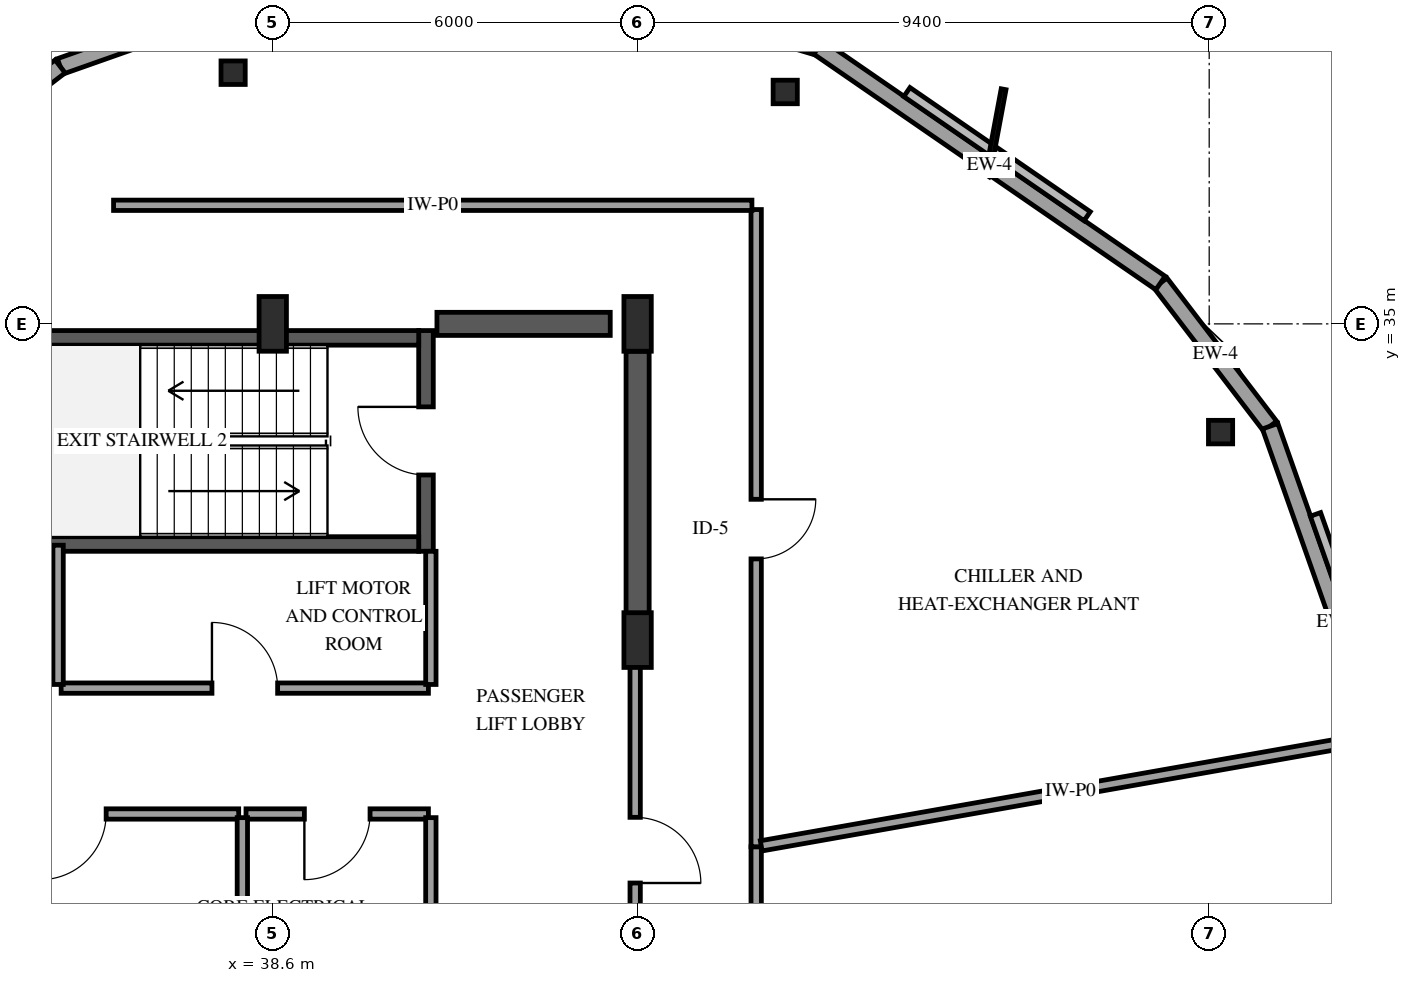
"""IFC4 building model, lengths in metres.
Left out: names, types, materials, properties, quantities, classifications, styles, units other than length and angle.
Written with IfcOpenShell. Run it as: python <this file> out.ifc"""

import sys

from ifc_helpers import new_model, si_unit, direction, frame, frame_2d, origin, origin_2d, place, context, subcontext, project, spatial, rectangle, i_section, extrude, element, fill, save


model = new_model("IFC4")
c1 = context("Model", 3, precision=1e-05, world=origin(), true_north=direction((0.0, 1.0)))
c2 = subcontext(c1, "Body", "Model", "MODEL_VIEW")
j1 = project(units=[si_unit("LENGTHUNIT", "METRE"), si_unit("PLANEANGLEUNIT", "RADIAN")], contexts=[c1])
p1 = place(None, origin())
s1 = spatial("IfcSite", under=j1, at=p1, CompositionType="ELEMENT")
p2 = place(p1, origin())
s2 = spatial("IfcBuilding", under=s1, at=p2, CompositionType="ELEMENT")
p3 = place(p2, frame((0.0, 0.0, 305.65)))
s3 = spatial("IfcBuildingStorey", under=s2, at=p3, CompositionType="ELEMENT", Elevation=305.65)
p4 = place(p3, frame((41.12, 31.26, 0.0), z_axis=(0.0, 0.0, 1.0), x_axis=(0.0, 1.0, 0.0)))
e1 = element("IfcWall", 1, at=p4, inside=s3, PredefinedType="SHEAR", context=c2, shape_type="SweptSolid", body=[
    extrude(rectangle(XDim=3.63, YDim=0.24, at=frame_2d((1.815, 0.0))), origin(), (0.0, 0.0, 1.0), 4.2),
])
p5 = place(p4, frame((1.255, 0.0, 0.0)))
e2 = element("IfcOpeningElement", 2, at=p5, cuts=e1, PredefinedType="OPENING", context=c2, shape_type="SweptSolid", body=[
    extrude(rectangle(XDim=1.12, YDim=2.15, at=frame_2d((0.56, 1.075))), frame((0.0, 0.13, 0.0), z_axis=(0.0, -1.0, 0.0), x_axis=(1.0, 0.0, 0.0)), (0.0, 0.0, 1.0), 0.26),
])
for number, where, z_axis, x_axis in (
    (3, (33.0, 31.38, 0.0), (0.0, 0.0, 1.0), (1.0, 0.0, 0.0)),
    (4, (33.0, 34.77, 0.0), (0.0, 0.0, 1.0), (1.0, 0.0, 0.0)),
):
    element("IfcWall", number, at=place(p3, frame(where, z_axis=z_axis, x_axis=x_axis)), inside=s3, PredefinedType="SHEAR", context=c2, shape_type="SweptSolid", body=[
        extrude(rectangle(XDim=8.0, YDim=0.24, at=frame_2d((4.0, 0.0))), origin(), (0.0, 0.0, 1.0), 4.2),
    ])
p6 = place(p3, frame((41.3, 35.0, 0.0), z_axis=(0.0, 0.0, 1.0), x_axis=(1.0, 0.0, 0.0)))
e5 = element("IfcWall", 5, at=p6, inside=s3, PredefinedType="SHEAR", context=c2, shape_type="SweptSolid", body=[
    extrude(rectangle(XDim=2.85, YDim=0.38, at=frame_2d((1.425, 0.0))), origin(), (0.0, 0.0, 1.0), 4.2),
])
p7 = place(p3, frame((44.6, 29.8, 0.0), z_axis=(0.0, 0.0, 1.0), x_axis=(0.0, 1.0, 0.0)))
e6 = element("IfcWall", 6, at=p7, inside=s3, PredefinedType="SHEAR", context=c2, shape_type="SweptSolid", body=[
    extrude(rectangle(XDim=4.75, YDim=0.38, at=frame_2d((2.375, 0.0))), origin(), (0.0, 0.0, 1.0), 4.2),
])
for number, where, z_axis, x_axis in (
    (7, (38.6, 35.0, 0.0), (0.0, 0.0, 1.0), (1.0, 0.0, 0.0)),
    (8, (44.6, 29.8, 0.0), (0.0, 0.0, 1.0), (1.0, 0.0, 0.0)),
    (9, (44.6, 35.0, 0.0), (0.0, 0.0, 1.0), (1.0, 0.0, 0.0)),
):
    element("IfcColumn", number, at=place(p3, frame(where, z_axis=z_axis, x_axis=x_axis)), inside=s3, PredefinedType="PILASTER", context=c2, shape_type="SweptSolid", body=[
        extrude(rectangle(XDim=0.45, YDim=0.9, at=origin_2d()), origin(), (0.0, 0.0, 1.0), 4.2),
    ])
for number, where, z_axis, x_axis in (
    (10, (54.187, 33.22, 0.0), (0.0, 0.0, 1.0), (1.0, 0.0, 0.0)),
    (11, (47.028, 38.813, 0.0), (0.0, 0.0, 1.0), (1.0, 0.0, 0.0)),
    (12, (37.948, 39.131, 0.0), (0.0, 0.0, 1.0), (1.0, 0.0, 0.0)),
):
    element("IfcColumn", number, at=place(p3, frame(where, z_axis=z_axis, x_axis=x_axis)), inside=s3, PredefinedType="COLUMN", context=c2, shape_type="SweptSolid", body=[
        extrude(i_section(OverallWidth=0.398, OverallDepth=0.387, WebThickness=0.021, FlangeThickness=0.033, FilletRadius=0.038, at=origin_2d()), origin(), (0.0, 0.0, 1.0), 4.2),
    ])
p8 = place(p3, frame((37.901, 40.221, 0.0), z_axis=(0.0, 0.0, 1.0), x_axis=(-0.942990333583, -0.332820117735, 0.0)))
e13 = element("IfcWall", 13, at=p8, inside=s3, PredefinedType="SOLIDWALL", context=c2, shape_type="SweptSolid", body=[
    extrude(rectangle(XDim=2.967, YDim=0.27, at=frame_2d((1.483, 0.0))), origin(), (0.0, 0.0, 1.0), 3.195),
])
p9 = place(p3, frame((35.103, 39.234, 0.0), z_axis=(0.0, 0.0, 1.0), x_axis=(-0.794007710978, -0.607907686173, 0.0)))
e14 = element("IfcWall", 14, at=p9, inside=s3, PredefinedType="SOLIDWALL", context=c2, shape_type="SweptSolid", body=[
    extrude(rectangle(XDim=6.831, YDim=0.27, at=frame_2d((3.416, 0.0))), origin(), (0.0, 0.0, 1.0), 3.195),
])
p10 = place(p3, frame((55.002, 33.317, 0.0), z_axis=(0.0, 0.0, 1.0), x_axis=(-0.607871587538, 0.79403534749, 0.0)))
e15 = element("IfcWall", 15, at=p10, inside=s3, PredefinedType="SOLIDWALL", context=c2, shape_type="SweptSolid", body=[
    extrude(rectangle(XDim=2.967, YDim=0.27, at=frame_2d((1.483, 0.0))), origin(), (0.0, 0.0, 1.0), 3.195),
])
p11 = place(p3, frame((57.276, 26.875, 0.0), z_axis=(0.0, 0.0, 1.0), x_axis=(-0.332840681535, 0.942983075519, 0.0)))
e16 = element("IfcWall", 16, at=p11, inside=s3, PredefinedType="SOLIDWALL", context=c2, shape_type="SweptSolid", body=[
    extrude(rectangle(XDim=6.831, YDim=0.27, at=frame_2d((3.416, 0.0))), origin(), (0.0, 0.0, 1.0), 3.195),
])
p12 = place(p3, frame((47.573, 39.548, 0.0), z_axis=(0.0, 0.0, 1.0), x_axis=(-0.958527849857, 0.284998879029, 0.0)))
e17 = element("IfcWall", 17, at=p12, inside=s3, PredefinedType="SOLIDWALL", context=c2, shape_type="SweptSolid", body=[
    extrude(rectangle(XDim=2.967, YDim=0.27, at=frame_2d((1.483, 0.0))), origin(), (0.0, 0.0, 1.0), 3.195),
])
p13 = place(p3, frame((53.199, 35.672, 0.0), z_axis=(0.0, 0.0, 1.0), x_axis=(-0.823525410079, 0.567279383509, 0.0)))
e18 = element("IfcWall", 18, at=p13, inside=s3, PredefinedType="SOLIDWALL", context=c2, shape_type="SweptSolid", body=[
    extrude(rectangle(XDim=6.831, YDim=0.27, at=frame_2d((3.416, 0.0))), origin(), (0.0, 0.0, 1.0), 3.195),
])
p14 = place(p3, frame((46.55, 26.401, 0.0), z_axis=(0.0, 0.0, 1.0), x_axis=(0.0, -1.0, 0.0)))
e19 = element("IfcWall", 19, at=p14, inside=s3, PredefinedType="PARTITIONING", context=c2, shape_type="SweptSolid", body=[
    extrude(rectangle(XDim=13.281, YDim=0.17, at=frame_2d((6.64, 0.0))), origin(), (0.0, 0.0, 1.0), 3.895),
])
p15 = place(p14, frame((6.166, 0.0, 0.0)))
e20 = element("IfcOpeningElement", 20, at=p15, cuts=e19, PredefinedType="OPENING", context=c2, shape_type="SweptSolid", body=[
    extrude(rectangle(XDim=0.98, YDim=2.15, at=frame_2d((0.49, 1.075))), frame((0.0, 0.095, 0.0), z_axis=(0.0, -1.0, 0.0), x_axis=(1.0, 0.0, 0.0)), (0.0, 0.0, 1.0), 0.19),
])
p16 = place(p3, frame((46.55, 36.88, 0.0), z_axis=(0.0, 0.0, 1.0), x_axis=(0.0, -1.0, 0.0)))
e21 = element("IfcWall", 21, at=p16, inside=s3, PredefinedType="PARTITIONING", context=c2, shape_type="SweptSolid", body=[
    extrude(rectangle(XDim=10.479, YDim=0.17, at=frame_2d((5.24, 0.0))), origin(), (0.0, 0.0, 1.0), 3.895),
])
p17 = place(p16, frame((4.765, 0.0, 0.0)))
e22 = element("IfcOpeningElement", 22, at=p17, cuts=e21, PredefinedType="OPENING", context=c2, shape_type="SweptSolid", body=[
    extrude(rectangle(XDim=0.98, YDim=2.15, at=frame_2d((0.49, 1.075))), frame((0.0, 0.095, 0.0), z_axis=(0.0, -1.0, 0.0), x_axis=(1.0, 0.0, 0.0)), (0.0, 0.0, 1.0), 0.19),
])
p18 = place(p3, frame((56.805, 28.21, 0.0), z_axis=(0.0, 0.0, 1.0), x_axis=(-0.984801637981, -0.173682854164, 0.0)))
e23 = element("IfcWall", 23, at=p18, inside=s3, PredefinedType="PARTITIONING", context=c2, shape_type="SweptSolid", body=[
    extrude(rectangle(XDim=10.329, YDim=0.17, at=frame_2d((5.165, 0.0))), origin(), (0.0, 0.0, 1.0), 3.895),
])
p19 = place(p3, frame((44.56, 29.8, 0.0), z_axis=(0.0, 0.0, 1.0), x_axis=(0.0, -1.0, 0.0)))
e24 = element("IfcWall", 24, at=p19, inside=s3, PredefinedType="PARTITIONING", context=c2, shape_type="SweptSolid", body=[
    extrude(rectangle(XDim=6.91, YDim=0.17, at=frame_2d((3.455, 0.0))), origin(), (0.0, 0.0, 1.0), 2.935),
])
p20 = place(p19, frame((2.915, 0.0, 0.0)))
e25 = element("IfcOpeningElement", 25, at=p20, cuts=e24, PredefinedType="OPENING", context=c2, shape_type="SweptSolid", body=[
    extrude(rectangle(XDim=1.08, YDim=2.15, at=frame_2d((0.54, 1.075))), frame((0.0, 0.095, 0.0), z_axis=(0.0, -1.0, 0.0), x_axis=(1.0, 0.0, 0.0)), (0.0, 0.0, 1.0), 0.19),
])
p21 = place(p3, frame((35.12, 29.01, 0.0), z_axis=(0.0, 0.0, 1.0), x_axis=(1.0, 0.0, 0.0)))
e26 = element("IfcWall", 26, at=p21, inside=s3, PredefinedType="PARTITIONING", context=c2, shape_type="SweptSolid", body=[
    extrude(rectangle(XDim=6.04, YDim=0.17, at=frame_2d((3.02, 0.0))), origin(), (0.0, 0.0, 1.0), 3.895),
])
p22 = place(p21, frame((2.48, 0.0, 0.0)))
e27 = element("IfcOpeningElement", 27, at=p22, cuts=e26, PredefinedType="OPENING", context=c2, shape_type="SweptSolid", body=[
    extrude(rectangle(XDim=1.08, YDim=2.15, at=frame_2d((0.54, 1.075))), frame((0.0, 0.095, 0.0), z_axis=(0.0, -1.0, 0.0), x_axis=(1.0, 0.0, 0.0)), (0.0, 0.0, 1.0), 0.19),
])
p23 = place(p3, frame((38.04, 26.94, 0.0), z_axis=(0.0, 0.0, 1.0), x_axis=(-1.0, 0.0, 0.0)))
e28 = element("IfcWall", 28, at=p23, inside=s3, PredefinedType="PARTITIONING", context=c2, shape_type="SweptSolid", body=[
    extrude(rectangle(XDim=5.44, YDim=0.17, at=frame_2d((2.72, 0.0))), origin(), (0.0, 0.0, 1.0), 3.895),
])
p24 = place(p23, frame((2.18, 0.0, 0.0)))
e29 = element("IfcOpeningElement", 29, at=p24, cuts=e28, PredefinedType="OPENING", context=c2, shape_type="SweptSolid", body=[
    extrude(rectangle(XDim=1.08, YDim=2.15, at=frame_2d((0.54, 1.075))), frame((0.0, 0.095, 0.0), z_axis=(0.0, -1.0, 0.0), x_axis=(1.0, 0.0, 0.0)), (0.0, 0.0, 1.0), 0.19),
])
p25 = place(p3, frame((41.16, 26.94, 0.0), z_axis=(0.0, 0.0, 1.0), x_axis=(-1.0, 0.0, 0.0)))
e30 = element("IfcWall", 30, at=p25, inside=s3, PredefinedType="PARTITIONING", context=c2, shape_type="SweptSolid", body=[
    extrude(rectangle(XDim=3.0, YDim=0.17, at=frame_2d((1.5, 0.0))), origin(), (0.0, 0.0, 1.0), 3.895),
])
p26 = place(p25, frame((0.96, 0.0, 0.0)))
e31 = element("IfcOpeningElement", 31, at=p26, cuts=e30, PredefinedType="OPENING", context=c2, shape_type="SweptSolid", body=[
    extrude(rectangle(XDim=1.08, YDim=2.15, at=frame_2d((0.54, 1.075))), frame((0.0, 0.095, 0.0), z_axis=(0.0, -1.0, 0.0), x_axis=(1.0, 0.0, 0.0)), (0.0, 0.0, 1.0), 0.19),
])
p27 = place(p3, frame((38.1, 26.88, 0.0), z_axis=(0.0, 0.0, 1.0), x_axis=(0.0, -1.0, 0.0)))
e32 = element("IfcWall", 32, at=p27, inside=s3, PredefinedType="PARTITIONING", context=c2, shape_type="SweptSolid", body=[
    extrude(rectangle(XDim=2.58, YDim=0.17, at=frame_2d((1.29, 0.0))), origin(), (0.0, 0.0, 1.0), 3.895),
])
p28 = place(p3, frame((41.2, 24.55, 0.0), z_axis=(0.0, 0.0, 1.0), x_axis=(0.0, 1.0, 0.0)))
e33 = element("IfcWall", 33, at=p28, inside=s3, PredefinedType="PARTITIONING", context=c2, shape_type="SweptSolid", body=[
    extrude(rectangle(XDim=2.33, YDim=0.17, at=frame_2d((1.165, 0.0))), origin(), (0.0, 0.0, 1.0), 3.895),
])
p29 = place(p3, frame((35.07, 31.36, 0.0), z_axis=(0.0, 0.0, 1.0), x_axis=(0.0, -1.0, 0.0)))
e34 = element("IfcWall", 34, at=p29, inside=s3, PredefinedType="PARTITIONING", context=c2, shape_type="SweptSolid", body=[
    extrude(rectangle(XDim=2.29, YDim=0.17, at=frame_2d((1.145, 0.0))), origin(), (0.0, 0.0, 1.0), 3.895),
])
p30 = place(p3, frame((41.2, 29.07, 0.0), z_axis=(0.0, 0.0, 1.0), x_axis=(0.0, 1.0, 0.0)))
e35 = element("IfcWall", 35, at=p30, inside=s3, PredefinedType="PARTITIONING", context=c2, shape_type="SweptSolid", body=[
    extrude(rectangle(XDim=2.19, YDim=0.17, at=frame_2d((1.095, 0.0))), origin(), (0.0, 0.0, 1.0), 3.895),
])
p31 = place(p3, frame((35.982, 36.95, 0.0), z_axis=(0.0, 0.0, 1.0), x_axis=(1.0, 0.0, 0.0)))
e36 = element("IfcWall", 36, at=p31, inside=s3, PredefinedType="PARTITIONING", context=c2, shape_type="SweptSolid", body=[
    extrude(rectangle(XDim=10.498, YDim=0.17, at=frame_2d((5.249, 0.0))), origin(), (0.0, 0.0, 1.0), 3.895),
])
p32 = place(p5, origin())
e37 = element("IfcDoor", 37, at=p32, inside=s3, OperationType="SINGLE_SWING_RIGHT", PredefinedType="DOOR", context=c2, shape_type="SweptSolid", body=[
    extrude(rectangle(XDim=1.12, YDim=2.15, at=frame_2d((0.56, 1.075))), frame((0.0, 0.025, 0.0), z_axis=(0.0, -1.0, 0.0), x_axis=(1.0, 0.0, 0.0)), (0.0, 0.0, 1.0), 0.05),
])
fill(e2, e37)
p33 = place(p17, origin())
e38 = element("IfcDoor", 38, at=p33, inside=s3, OperationType="SINGLE_SWING_LEFT", PredefinedType="DOOR", context=c2, shape_type="SweptSolid", body=[
    extrude(rectangle(XDim=0.98, YDim=2.15, at=frame_2d((0.49, 1.075))), frame((0.0, 0.025, 0.0), z_axis=(0.0, -1.0, 0.0), x_axis=(1.0, 0.0, 0.0)), (0.0, 0.0, 1.0), 0.05),
])
fill(e22, e38)
p34 = place(p20, origin())
e39 = element("IfcDoor", 39, at=p34, inside=s3, OperationType="SINGLE_SWING_RIGHT", PredefinedType="DOOR", context=c2, shape_type="SweptSolid", body=[
    extrude(rectangle(XDim=1.08, YDim=2.15, at=frame_2d((0.54, 1.075))), frame((0.0, 0.025, 0.0), z_axis=(0.0, -1.0, 0.0), x_axis=(1.0, 0.0, 0.0)), (0.0, 0.0, 1.0), 0.05),
])
fill(e25, e39)
p35 = place(p22, origin())
e40 = element("IfcDoor", 40, at=p35, inside=s3, OperationType="SINGLE_SWING_LEFT", PredefinedType="DOOR", context=c2, shape_type="SweptSolid", body=[
    extrude(rectangle(XDim=1.08, YDim=2.15, at=frame_2d((0.54, 1.075))), frame((0.0, 0.025, 0.0), z_axis=(0.0, -1.0, 0.0), x_axis=(1.0, 0.0, 0.0)), (0.0, 0.0, 1.0), 0.05),
])
fill(e27, e40)
p36 = place(p24, origin())
e41 = element("IfcDoor", 41, at=p36, inside=s3, OperationType="SINGLE_SWING_RIGHT", PredefinedType="DOOR", context=c2, shape_type="SweptSolid", body=[
    extrude(rectangle(XDim=1.08, YDim=2.15, at=frame_2d((0.54, 1.075))), frame((0.0, 0.025, 0.0), z_axis=(0.0, -1.0, 0.0), x_axis=(1.0, 0.0, 0.0)), (0.0, 0.0, 1.0), 0.05),
])
fill(e29, e41)
p37 = place(p26, origin())
e42 = element("IfcDoor", 42, at=p37, inside=s3, OperationType="SINGLE_SWING_RIGHT", PredefinedType="DOOR", context=c2, shape_type="SweptSolid", body=[
    extrude(rectangle(XDim=1.08, YDim=2.15, at=frame_2d((0.54, 1.075))), frame((0.0, 0.025, 0.0), z_axis=(0.0, -1.0, 0.0), x_axis=(1.0, 0.0, 0.0)), (0.0, 0.0, 1.0), 0.05),
])
fill(e31, e42)
save(model, sys.argv[1])
